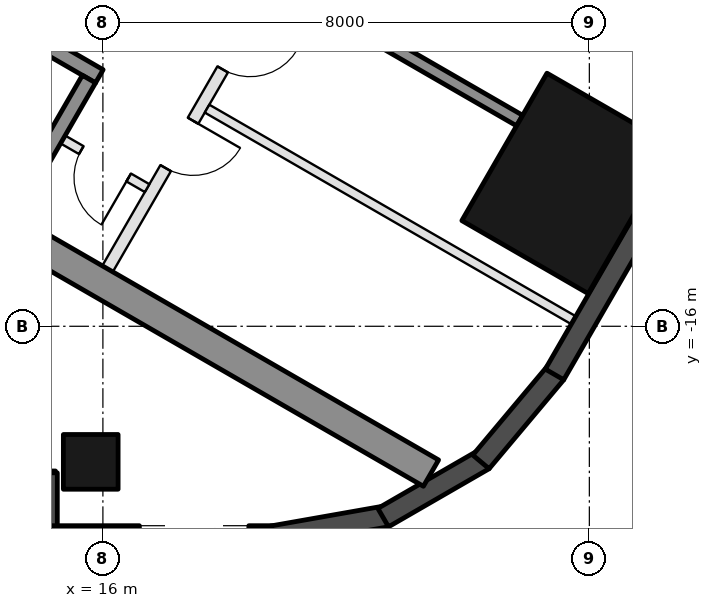
"""IFC4 building model, lengths in metres.
Left out: names, types, materials, properties, quantities, classifications, styles, units other than length and angle.
Written with IfcOpenShell. Run it as: python <this file> out.ifc"""

import sys

from ifc_helpers import new_model, si_unit, direction, frame, frame_2d, origin, origin_2d, place, context, subcontext, project, spatial, rectangle, hollow_rectangle, extrude, element, fill, save


model = new_model("IFC4")
c1 = context("Model", 3, precision=1e-05, world=origin(), true_north=direction((0.0, 1.0)))
c2 = subcontext(c1, "Body", "Model", "MODEL_VIEW")
j1 = project(units=[si_unit("LENGTHUNIT", "METRE"), si_unit("PLANEANGLEUNIT", "RADIAN")], contexts=[c1])
p1 = place(None, origin())
s1 = spatial("IfcSite", under=j1, at=p1, CompositionType="ELEMENT")
p2 = place(p1, origin())
s2 = spatial("IfcBuilding", under=s1, at=p2, CompositionType="ELEMENT")
p3 = place(p2, frame((0.0, 0.0, 120.5)))
s3 = spatial("IfcBuildingStorey", under=s2, at=p3, CompositionType="ELEMENT", Elevation=120.5)
p4 = place(p3, frame((15.8, -18.23, 0.0), z_axis=(0.0, 0.0, 1.0), x_axis=(-1.0, 0.0, 0.0)))
e1 = element("IfcColumn", 1, at=p4, inside=s3, PredefinedType="COLUMN", context=c2, shape_type="SweptSolid", body=[
    extrude(hollow_rectangle(XDim=0.9, YDim=0.9, WallThickness=0.04, at=origin_2d()), origin(), (0.0, 0.0, 1.0), 3.7),
])
p5 = place(p3, frame((23.643, -13.65, 0.0), z_axis=(0.0, 0.0, 1.0), x_axis=(0.5, 0.866025403784, 0.0)))
e2 = element("IfcColumn", 2, at=p5, inside=s3, PredefinedType="COLUMN", context=c2, shape_type="SweptSolid", body=[
    extrude(hollow_rectangle(XDim=2.8, YDim=2.4, WallThickness=0.07, at=origin_2d()), origin(), (0.0, 0.0, 1.0), 3.7),
])
p6 = place(p3, frame((8.48, -18.555, 0.0), z_axis=(0.0, 0.0, 1.0), x_axis=(1.0, 0.0, 0.0)))
e3 = element("IfcWall", 3, at=p6, inside=s3, PredefinedType="SOLIDWALL", context=c2, shape_type="SweptSolid", body=[
    extrude(rectangle(XDim=6.74, YDim=0.35, at=frame_2d((3.37, 0.0))), origin(), (0.0, 0.0, 1.0), 3.55),
])
p7 = place(p6, frame((0.32, 0.0, 0.3)))
e4 = element("IfcOpeningElement", 4, at=p7, cuts=e3, PredefinedType="OPENING", context=c2, shape_type="SweptSolid", body=[
    extrude(rectangle(XDim=2.6, YDim=2.65, at=frame_2d((1.3, 1.325))), frame((0.0, 0.185, 0.0), z_axis=(0.0, -1.0, 0.0), x_axis=(1.0, 0.0, 0.0)), (0.0, 0.0, 1.0), 0.37),
])
p8 = place(p6, frame((3.22, 0.0, 0.3)))
e5 = element("IfcOpeningElement", 5, at=p8, cuts=e3, PredefinedType="OPENING", context=c2, shape_type="SweptSolid", body=[
    extrude(rectangle(XDim=2.6, YDim=2.65, at=frame_2d((1.3, 1.325))), frame((0.0, 0.185, 0.0), z_axis=(0.0, -1.0, 0.0), x_axis=(1.0, 0.0, 0.0)), (0.0, 0.0, 1.0), 0.37),
])
p9 = place(p3, frame((15.075, -18.41, 0.0), z_axis=(0.0, 0.0, 1.0), x_axis=(0.0, -1.0, 0.0)))
e6 = element("IfcWall", 6, at=p9, inside=s3, PredefinedType="SOLIDWALL", context=c2, shape_type="SweptSolid", body=[
    extrude(rectangle(XDim=1.22, YDim=0.35, at=frame_2d((0.61, 0.0))), origin(), (0.0, 0.0, 1.0), 3.55),
])
p10 = place(p3, frame((14.9, -19.455, 0.0), z_axis=(0.0, 0.0, 1.0), x_axis=(1.0, 0.0, 0.0)))
e7 = element("IfcWall", 7, at=p10, inside=s3, PredefinedType="SOLIDWALL", context=c2, shape_type="SweptSolid", body=[
    extrude(rectangle(XDim=3.916, YDim=0.35, at=frame_2d((1.958, 0.0))), origin(), (0.0, 0.0, 1.0), 3.55),
])
p11 = place(p10, frame((1.7, 0.0, 0.3)))
e8 = element("IfcOpeningElement", 8, at=p11, cuts=e7, PredefinedType="OPENING", context=c2, shape_type="SweptSolid", body=[
    extrude(rectangle(XDim=1.8, YDim=2.65, at=frame_2d((0.9, 1.325))), frame((0.0, 0.185, 0.0), z_axis=(0.0, -1.0, 0.0), x_axis=(1.0, 0.0, 0.0)), (0.0, 0.0, 1.0), 0.37),
])
p12 = place(p3, frame((18.785, -19.458, 0.0), z_axis=(0.0, 0.0, 1.0), x_axis=(0.984798995425, 0.173697837091, 0.0)))
e9 = element("IfcWall", 9, at=p12, inside=s3, PredefinedType="SOLIDWALL", context=c2, shape_type="SweptSolid", body=[
    extrude(rectangle(XDim=1.91, YDim=0.35, at=frame_2d((0.955, 0.0))), origin(), (0.0, 0.0, 1.0), 3.55),
])
for number, where, z_axis, x_axis in (
    (10, (20.61, -19.147, 0.0), (0.0, 0.0, 1.0), (0.866, 0.5, 0.0)),
    (11, (22.217, -18.231, 0.0), (0.0, 0.0, 1.0), (0.643, 0.766, 0.0)),
):
    element("IfcWall", number, at=place(p3, frame(where, z_axis=z_axis, x_axis=x_axis)), inside=s3, PredefinedType="SOLIDWALL", context=c2, shape_type="SweptSolid", body=[
        extrude(rectangle(XDim=1.91, YDim=0.35, at=frame_2d((0.955, 0.0))), origin(), (0.0, 0.0, 1.0), 3.55),
    ])
p13 = place(p3, frame((23.427, -16.792, 0.0), z_axis=(0.0, 0.0, 1.0), x_axis=(0.500018773155, 0.866014564827, 0.0)))
e12 = element("IfcWall", 12, at=p13, inside=s3, PredefinedType="SOLIDWALL", context=c2, shape_type="SweptSolid", body=[
    extrude(rectangle(XDim=5.658, YDim=0.35, at=frame_2d((2.829, 0.0))), origin(), (0.0, 0.0, 1.0), 3.55),
])
p14 = place(p3, frame((8.547, -10.997, 0.0), z_axis=(0.0, 0.0, 1.0), x_axis=(0.866025009528, -0.500000682871, 0.0)))
e13 = element("IfcWall", 13, at=p14, inside=s3, PredefinedType="SHEAR", context=c2, shape_type="SweptSolid", body=[
    extrude(rectangle(XDim=14.837, YDim=0.5, at=frame_2d((7.418, 0.0))), origin(), (0.0, 0.0, 1.0), 3.5),
])
p15 = place(p3, frame((10.356, -8.664, 0.0), z_axis=(0.0, 0.0, 1.0), x_axis=(0.866028629588, -0.499994412703, 0.0)))
e14 = element("IfcWall", 14, at=p15, inside=s3, PredefinedType="SHEAR", context=c2, shape_type="SweptSolid", body=[
    extrude(rectangle(XDim=6.45, YDim=0.25, at=frame_2d((3.225, 0.0))), origin(), (0.0, 0.0, 1.0), 3.5),
])
p16 = place(p15, frame((0.3, 0.0, 0.0)))
e15 = element("IfcOpeningElement", 15, at=p16, cuts=e14, PredefinedType="OPENING", context=c2, shape_type="SweptSolid", body=[
    extrude(rectangle(XDim=1.0, YDim=2.1, at=frame_2d((0.5, 1.05))), frame((0.0, 0.135, 0.0), z_axis=(0.0, -1.0, 0.0), x_axis=(1.0, 0.0, 0.0)), (0.0, 0.0, 1.0), 0.27),
])
p17 = place(p3, frame((14.496, -14.143, 0.0), z_axis=(0.0, 0.0, 1.0), x_axis=(0.500062241894, 0.865989465428, 0.0)))
e16 = element("IfcWall", 16, at=p17, inside=s3, PredefinedType="SHEAR", context=c2, shape_type="SweptSolid", body=[
    extrude(rectangle(XDim=2.55, YDim=0.25, at=frame_2d((1.275, 0.0))), origin(), (0.0, 0.0, 1.0), 3.5),
])
p18 = place(p3, frame((20.567, -11.297, 0.0), z_axis=(0.0, 0.0, 1.0), x_axis=(0.866060851709, -0.499938597367, 0.0)))
e17 = element("IfcWall", 17, at=p18, inside=s3, PredefinedType="SHEAR", context=c2, shape_type="SweptSolid", body=[
    extrude(rectangle(XDim=2.64, YDim=0.2, at=frame_2d((1.32, 0.0))), origin(), (0.0, 0.0, 1.0), 3.5),
])
p19 = place(p3, frame((16.076, -15.055, 0.0), z_axis=(0.0, 0.0, 1.0), x_axis=(0.499995103361, 0.866028230842, 0.0)))
e18 = element("IfcWall", 18, at=p19, inside=s3, PredefinedType="PARTITIONING", context=c2, shape_type="SweptSolid", body=[
    extrude(rectangle(XDim=5.4, YDim=0.2, at=frame_2d((2.7, 0.0))), origin(), (0.0, 0.0, 1.0), 3.5),
])
p20 = place(p19, frame((1.913, 0.0, 0.0)))
e19 = element("IfcOpeningElement", 19, at=p20, cuts=e18, PredefinedType="OPENING", context=c2, shape_type="SweptSolid", body=[
    extrude(rectangle(XDim=0.9, YDim=2.1, at=frame_2d((0.45, 1.05))), frame((0.0, 0.11, 0.0), z_axis=(0.0, -1.0, 0.0), x_axis=(1.0, 0.0, 0.0)), (0.0, 0.0, 1.0), 0.22),
])
p21 = place(p19, frame((3.788, 0.0, 0.0)))
e20 = element("IfcOpeningElement", 20, at=p21, cuts=e18, PredefinedType="OPENING", context=c2, shape_type="SweptSolid", body=[
    extrude(rectangle(XDim=0.9, YDim=2.1, at=frame_2d((0.45, 1.05))), frame((0.0, 0.11, 0.0), z_axis=(0.0, -1.0, 0.0), x_axis=(1.0, 0.0, 0.0)), (0.0, 0.0, 1.0), 0.22),
])
p22 = place(p3, frame((15.342, -12.928, 0.0), z_axis=(0.0, 0.0, 1.0), x_axis=(0.865989903783, -0.500061482766, 0.0)))
e21 = element("IfcWall", 21, at=p22, inside=s3, PredefinedType="PARTITIONING", context=c2, shape_type="SweptSolid", body=[
    extrude(rectangle(XDim=1.6, YDim=0.15, at=frame_2d((0.8, 0.0))), origin(), (0.0, 0.0, 1.0), 3.5),
])
p23 = place(p22, frame((0.35, 0.0, 0.0)))
e22 = element("IfcOpeningElement", 22, at=p23, cuts=e21, PredefinedType="OPENING", context=c2, shape_type="SweptSolid", body=[
    extrude(rectangle(XDim=0.9, YDim=2.1, at=frame_2d((0.45, 1.05))), frame((0.0, 0.085, 0.0), z_axis=(0.0, -1.0, 0.0), x_axis=(1.0, 0.0, 0.0)), (0.0, 0.0, 1.0), 0.17),
])
p24 = place(p3, frame((17.713, -12.42, 0.0), z_axis=(0.0, 0.0, 1.0), x_axis=(0.866016523273, -0.500015381182, 0.0)))
e23 = element("IfcWall", 23, at=p24, inside=s3, PredefinedType="PARTITIONING", context=c2, shape_type="SweptSolid", body=[
    extrude(rectangle(XDim=6.95, YDim=0.15, at=frame_2d((3.475, 0.0))), origin(), (0.0, 0.0, 1.0), 3.5),
])
p25 = place(p23, frame((0.9, 0.0, 0.0), z_axis=(0.0, 0.0, 1.0), x_axis=(-1.0, 0.0, 0.0)))
e24 = element("IfcDoor", 24, at=p25, inside=s3, OperationType="SINGLE_SWING_LEFT", PredefinedType="DOOR", context=c2, shape_type="SweptSolid", body=[
    extrude(rectangle(XDim=0.9, YDim=2.1, at=frame_2d((0.45, 1.05))), frame((0.0, 0.025, 0.0), z_axis=(0.0, -1.0, 0.0), x_axis=(1.0, 0.0, 0.0)), (0.0, 0.0, 1.0), 0.05),
])
fill(e22, e24)
p26 = place(p20, frame((0.9, 0.0, 0.0), z_axis=(0.0, 0.0, 1.0), x_axis=(-1.0, 0.0, 0.0)))
e25 = element("IfcDoor", 25, at=p26, inside=s3, OperationType="SINGLE_SWING_LEFT", PredefinedType="DOOR", context=c2, shape_type="SweptSolid", body=[
    extrude(rectangle(XDim=0.9, YDim=2.1, at=frame_2d((0.45, 1.05))), frame((0.0, 0.025, 0.0), z_axis=(0.0, -1.0, 0.0), x_axis=(1.0, 0.0, 0.0)), (0.0, 0.0, 1.0), 0.05),
])
fill(e19, e25)
p27 = place(p21, frame((0.9, 0.0, 0.0), z_axis=(0.0, 0.0, 1.0), x_axis=(-1.0, 0.0, 0.0)))
e26 = element("IfcDoor", 26, at=p27, inside=s3, OperationType="SINGLE_SWING_LEFT", PredefinedType="DOOR", context=c2, shape_type="SweptSolid", body=[
    extrude(rectangle(XDim=0.9, YDim=2.1, at=frame_2d((0.45, 1.05))), frame((0.0, 0.025, 0.0), z_axis=(0.0, -1.0, 0.0), x_axis=(1.0, 0.0, 0.0)), (0.0, 0.0, 1.0), 0.05),
])
fill(e20, e26)
save(model, sys.argv[1])
